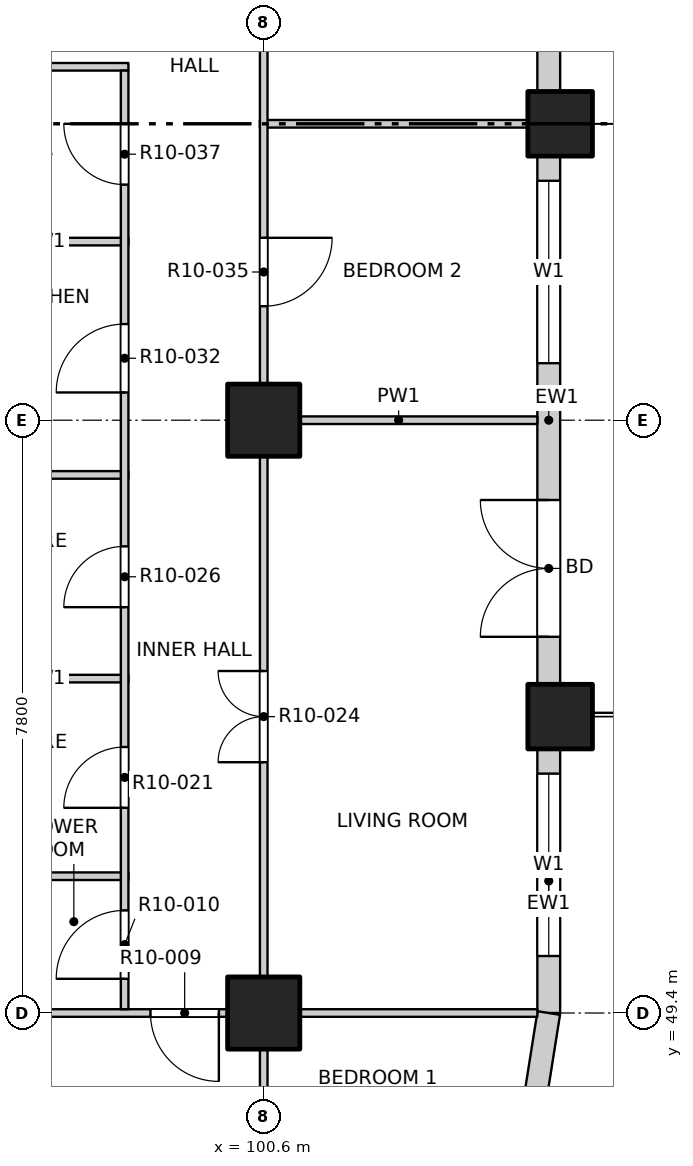
"""IFC4 building model, lengths in metres.
Left out: names, types, materials, properties, quantities, classifications, styles, units other than length and angle.
Written with IfcOpenShell. Run it as: python <this file> out.ifc"""

import sys

from ifc_helpers import new_model, si_unit, direction, frame, frame_2d, origin, origin_2d, place, context, subcontext, project, spatial, rectangle, extrude, element, fill, save


model = new_model("IFC4")
c1 = context("Model", 3, precision=1e-05, world=origin(), true_north=direction((0.0, 1.0)))
c2 = subcontext(c1, "Body", "Model", "MODEL_VIEW")
j1 = project(units=[si_unit("LENGTHUNIT", "METRE"), si_unit("PLANEANGLEUNIT", "RADIAN")], contexts=[c1])
p1 = place(None, origin())
s1 = spatial("IfcSite", under=j1, at=p1, CompositionType="ELEMENT")
p2 = place(p1, origin())
s2 = spatial("IfcBuilding", under=s1, at=p2, CompositionType="ELEMENT")
p3 = place(p2, frame((0.0, 0.0, 123.7)))
s3 = spatial("IfcBuildingStorey", under=s2, at=p3, CompositionType="ELEMENT", Elevation=123.7)
for number, where, z_axis, x_axis in (
    (1, (104.5, 53.3, -0.3), (0.0, 0.0, 1.0), (1.0, 0.0, 0.0)),
    (2, (104.5, 61.1, -0.3), (0.0, 0.0, 1.0), (1.0, 0.0, 0.0)),
):
    element("IfcColumn", number, at=place(p3, frame(where, z_axis=z_axis, x_axis=x_axis)), inside=s3, PredefinedType="COLUMN", context=c2, shape_type="SweptSolid", body=[
        extrude(rectangle(XDim=0.85, YDim=0.85, at=origin_2d()), origin(), (0.0, 0.0, 1.0), 3.45),
    ])
for number, where, z_axis, x_axis in (
    (3, (100.6, 49.4, -0.3), (0.0, 0.0, 1.0), (1.0, 0.0, 0.0)),
    (4, (100.6, 57.2, -0.3), (0.0, 0.0, 1.0), (1.0, 0.0, 0.0)),
):
    element("IfcColumn", number, at=place(p3, frame(where, z_axis=z_axis, x_axis=x_axis)), inside=s3, PredefinedType="COLUMN", context=c2, shape_type="SweptSolid", body=[
        extrude(rectangle(XDim=0.95, YDim=0.95, at=origin_2d()), origin(), (0.0, 0.0, 1.0), 3.45),
    ])
p4 = place(p3, frame((104.35, 49.4, 0.0), z_axis=(0.0, 0.0, 1.0), x_axis=(0.0, 1.0, 0.0)))
e5 = element("IfcWall", 5, at=p4, inside=s3, PredefinedType="SOLIDWALL", context=c2, shape_type="SweptSolid", body=[
    extrude(rectangle(XDim=3.475, YDim=0.3, at=frame_2d((1.738, 0.0))), origin(), (0.0, 0.0, 1.0), 2.7),
])
p5 = place(p4, frame((0.75, 0.0, 0.9)))
e6 = element("IfcOpeningElement", 6, at=p5, cuts=e5, PredefinedType="OPENING", context=c2, shape_type="SweptSolid", body=[
    extrude(rectangle(XDim=2.4, YDim=1.8, at=frame_2d((1.2, 0.9))), frame((0.0, 0.16, 0.0), z_axis=(0.0, -1.0, 0.0), x_axis=(1.0, 0.0, 0.0)), (0.0, 0.0, 1.0), 0.32),
])
p6 = place(p3, frame((104.35, 53.725, 0.0), z_axis=(0.0, 0.0, 1.0), x_axis=(0.0, 1.0, 0.0)))
e7 = element("IfcWall", 7, at=p6, inside=s3, PredefinedType="SOLIDWALL", context=c2, shape_type="SweptSolid", body=[
    extrude(rectangle(XDim=6.95, YDim=0.3, at=frame_2d((3.475, 0.0))), origin(), (0.0, 0.0, 1.0), 2.7),
])
p7 = place(p6, frame((0.625, 0.0, 0.0)))
e8 = element("IfcOpeningElement", 8, at=p7, cuts=e7, PredefinedType="OPENING", context=c2, shape_type="SweptSolid", body=[
    extrude(rectangle(XDim=1.8, YDim=2.4, at=frame_2d((0.9, 1.2))), frame((0.0, 0.16, 0.0), z_axis=(0.0, -1.0, 0.0), x_axis=(1.0, 0.0, 0.0)), (0.0, 0.0, 1.0), 0.32),
])
p8 = place(p6, frame((4.225, 0.0, 0.9)))
e9 = element("IfcOpeningElement", 9, at=p8, cuts=e7, PredefinedType="OPENING", context=c2, shape_type="SweptSolid", body=[
    extrude(rectangle(XDim=2.4, YDim=1.8, at=frame_2d((1.2, 0.9))), frame((0.0, 0.16, 0.0), z_axis=(0.0, -1.0, 0.0), x_axis=(1.0, 0.0, 0.0)), (0.0, 0.0, 1.0), 0.32),
])
p9 = place(p3, frame((104.35, 61.525, 0.0), z_axis=(0.0, 0.0, 1.0), x_axis=(0.0, 1.0, 0.0)))
e10 = element("IfcWall", 10, at=p9, inside=s3, PredefinedType="SOLIDWALL", context=c2, shape_type="SweptSolid", body=[
    extrude(rectangle(XDim=6.95, YDim=0.3, at=frame_2d((3.475, 0.0))), origin(), (0.0, 0.0, 1.0), 2.7),
])
p10 = place(p9, frame((0.625, 0.0, 0.0)))
e11 = element("IfcOpeningElement", 11, at=p10, cuts=e10, PredefinedType="OPENING", context=c2, shape_type="SweptSolid", body=[
    extrude(rectangle(XDim=1.8, YDim=2.4, at=frame_2d((0.9, 1.2))), frame((0.0, 0.16, 0.0), z_axis=(0.0, -1.0, 0.0), x_axis=(1.0, 0.0, 0.0)), (0.0, 0.0, 1.0), 0.32),
])
p11 = place(p9, frame((4.225, 0.0, 0.9)))
e12 = element("IfcOpeningElement", 12, at=p11, cuts=e10, PredefinedType="OPENING", context=c2, shape_type="SweptSolid", body=[
    extrude(rectangle(XDim=2.4, YDim=1.8, at=frame_2d((1.2, 0.9))), frame((0.0, 0.16, 0.0), z_axis=(0.0, -1.0, 0.0), x_axis=(1.0, 0.0, 0.0)), (0.0, 0.0, 1.0), 0.32),
])
p12 = place(p3, frame((104.167, 48.241, 0.0), z_axis=(0.0, 0.0, 1.0), x_axis=(0.156496880861, 0.987678452879, 0.0)))
e13 = element("IfcWall", 13, at=p12, inside=s3, PredefinedType="SOLIDWALL", context=c2, shape_type="SweptSolid", body=[
    extrude(rectangle(XDim=1.173, YDim=0.3, at=frame_2d((0.586, 0.0))), origin(), (0.0, 0.0, 1.0), 2.7),
])
p13 = place(p3, frame((65.8, 49.4, 0.0), z_axis=(0.0, 0.0, 1.0), x_axis=(1.0, 0.0, 0.0)))
e14 = element("IfcWall", 14, at=p13, inside=s3, PredefinedType="PARTITIONING", context=c2, shape_type="SweptSolid", body=[
    extrude(rectangle(XDim=38.4, YDim=0.1, at=frame_2d((19.2, 0.0))), origin(), (0.0, 0.0, 1.0), 3.15),
])
p14 = place(p13, frame((4.19, 0.0, 0.0)))
e15 = element("IfcOpeningElement", 15, at=p14, cuts=e14, PredefinedType="OPENING", context=c2, shape_type="SweptSolid", body=[
    extrude(rectangle(XDim=0.9, YDim=2.1, at=frame_2d((0.45, 1.05))), frame((0.0, 0.06, 0.0), z_axis=(0.0, -1.0, 0.0), x_axis=(1.0, 0.0, 0.0)), (0.0, 0.0, 1.0), 0.12),
])
p15 = place(p13, frame((9.0, 0.0, 0.0)))
e16 = element("IfcOpeningElement", 16, at=p15, cuts=e14, PredefinedType="OPENING", context=c2, shape_type="SweptSolid", body=[
    extrude(rectangle(XDim=0.9, YDim=2.1, at=frame_2d((0.45, 1.05))), frame((0.0, 0.06, 0.0), z_axis=(0.0, -1.0, 0.0), x_axis=(1.0, 0.0, 0.0)), (0.0, 0.0, 1.0), 0.12),
])
p16 = place(p13, frame((12.9, 0.0, 0.0)))
e17 = element("IfcOpeningElement", 17, at=p16, cuts=e14, PredefinedType="OPENING", context=c2, shape_type="SweptSolid", body=[
    extrude(rectangle(XDim=0.9, YDim=2.1, at=frame_2d((0.45, 1.05))), frame((0.0, 0.06, 0.0), z_axis=(0.0, -1.0, 0.0), x_axis=(1.0, 0.0, 0.0)), (0.0, 0.0, 1.0), 0.12),
])
p17 = place(p13, frame((16.8, 0.0, 0.0)))
e18 = element("IfcOpeningElement", 18, at=p17, cuts=e14, PredefinedType="OPENING", context=c2, shape_type="SweptSolid", body=[
    extrude(rectangle(XDim=0.9, YDim=2.1, at=frame_2d((0.45, 1.05))), frame((0.0, 0.06, 0.0), z_axis=(0.0, -1.0, 0.0), x_axis=(1.0, 0.0, 0.0)), (0.0, 0.0, 1.0), 0.12),
])
p18 = place(p13, frame((22.5, 0.0, 0.0)))
e19 = element("IfcOpeningElement", 19, at=p18, cuts=e14, PredefinedType="OPENING", context=c2, shape_type="SweptSolid", body=[
    extrude(rectangle(XDim=1.2, YDim=2.1, at=frame_2d((0.6, 1.05))), frame((0.0, 0.06, 0.0), z_axis=(0.0, -1.0, 0.0), x_axis=(1.0, 0.0, 0.0)), (0.0, 0.0, 1.0), 0.12),
])
p19 = place(p13, frame((28.5, 0.0, 0.0)))
e20 = element("IfcOpeningElement", 20, at=p19, cuts=e14, PredefinedType="OPENING", context=c2, shape_type="SweptSolid", body=[
    extrude(rectangle(XDim=0.9, YDim=2.1, at=frame_2d((0.45, 1.05))), frame((0.0, 0.06, 0.0), z_axis=(0.0, -1.0, 0.0), x_axis=(1.0, 0.0, 0.0)), (0.0, 0.0, 1.0), 0.12),
])
p20 = place(p13, frame((33.31, 0.0, 0.0)))
e21 = element("IfcOpeningElement", 21, at=p20, cuts=e14, PredefinedType="OPENING", context=c2, shape_type="SweptSolid", body=[
    extrude(rectangle(XDim=0.9, YDim=2.1, at=frame_2d((0.45, 1.05))), frame((0.0, 0.06, 0.0), z_axis=(0.0, -1.0, 0.0), x_axis=(1.0, 0.0, 0.0)), (0.0, 0.0, 1.0), 0.12),
])
p21 = place(p3, frame((96.8, 51.2, 0.0), z_axis=(0.0, 0.0, 1.0), x_axis=(1.0, 0.0, 0.0)))
e22 = element("IfcWall", 22, at=p21, inside=s3, PredefinedType="PARTITIONING", context=c2, shape_type="SweptSolid", body=[
    extrude(rectangle(XDim=2.02, YDim=0.1, at=frame_2d((1.01, 0.0))), origin(), (0.0, 0.0, 1.0), 3.15),
])
for number, where, z_axis, x_axis in (
    (23, (96.6, 53.8, 0.0), (0.0, 0.0, 1.0), (1.0, 0.0, 0.0)),
    (24, (96.6, 56.48, 0.0), (0.0, 0.0, 1.0), (1.0, 0.0, 0.0)),
):
    element("IfcWall", number, at=place(p3, frame(where, z_axis=z_axis, x_axis=x_axis)), inside=s3, PredefinedType="PARTITIONING", context=c2, shape_type="SweptSolid", body=[
        extrude(rectangle(XDim=2.22, YDim=0.1, at=frame_2d((1.11, 0.0))), origin(), (0.0, 0.0, 1.0), 3.15),
    ])
p22 = place(p3, frame((100.55, 57.2, 0.0), z_axis=(0.0, 0.0, 1.0), x_axis=(1.0, 0.0, 0.0)))
e25 = element("IfcWall", 25, at=p22, inside=s3, PredefinedType="PARTITIONING", context=c2, shape_type="SweptSolid", body=[
    extrude(rectangle(XDim=3.65, YDim=0.1, at=frame_2d((1.825, 0.0))), origin(), (0.0, 0.0, 1.0), 3.15),
])
p23 = place(p3, frame((96.6, 59.55, 0.0), z_axis=(0.0, 0.0, 1.0), x_axis=(1.0, 0.0, 0.0)))
e26 = element("IfcWall", 26, at=p23, inside=s3, PredefinedType="PARTITIONING", context=c2, shape_type="SweptSolid", body=[
    extrude(rectangle(XDim=2.22, YDim=0.1, at=frame_2d((1.11, 0.0))), origin(), (0.0, 0.0, 1.0), 3.15),
])
p24 = place(p3, frame((100.55, 61.1, 0.0), z_axis=(0.0, 0.0, 1.0), x_axis=(1.0, 0.0, 0.0)))
e27 = element("IfcWall", 27, at=p24, inside=s3, PredefinedType="PARTITIONING", context=c2, shape_type="SweptSolid", body=[
    extrude(rectangle(XDim=3.65, YDim=0.1, at=frame_2d((1.825, 0.0))), origin(), (0.0, 0.0, 1.0), 2.55),
])
p25 = place(p3, frame((96.6, 61.85, 0.0), z_axis=(0.0, 0.0, 1.0), x_axis=(1.0, 0.0, 0.0)))
e28 = element("IfcWall", 28, at=p25, inside=s3, PredefinedType="PARTITIONING", context=c2, shape_type="SweptSolid", body=[
    extrude(rectangle(XDim=2.22, YDim=0.1, at=frame_2d((1.11, 0.0))), origin(), (0.0, 0.0, 1.0), 3.15),
])
p26 = place(p3, frame((98.77, 49.45, 0.0), z_axis=(0.0, 0.0, 1.0), x_axis=(0.0, 1.0, 0.0)))
e29 = element("IfcWall", 29, at=p26, inside=s3, PredefinedType="PARTITIONING", context=c2, shape_type="SweptSolid", body=[
    extrude(rectangle(XDim=12.35, YDim=0.1, at=frame_2d((6.175, 0.0))), origin(), (0.0, 0.0, 1.0), 3.15),
])
p27 = place(p26, frame((0.4, 0.0, 0.0)))
e30 = element("IfcOpeningElement", 30, at=p27, cuts=e29, PredefinedType="OPENING", context=c2, shape_type="SweptSolid", body=[
    extrude(rectangle(XDim=0.9, YDim=2.1, at=frame_2d((0.45, 1.05))), frame((0.0, 0.06, 0.0), z_axis=(0.0, -1.0, 0.0), x_axis=(1.0, 0.0, 0.0)), (0.0, 0.0, 1.0), 0.12),
])
p28 = place(p26, frame((2.65, 0.0, 0.0)))
e31 = element("IfcOpeningElement", 31, at=p28, cuts=e29, PredefinedType="OPENING", context=c2, shape_type="SweptSolid", body=[
    extrude(rectangle(XDim=0.8, YDim=2.1, at=frame_2d((0.4, 1.05))), frame((0.0, 0.06, 0.0), z_axis=(0.0, -1.0, 0.0), x_axis=(1.0, 0.0, 0.0)), (0.0, 0.0, 1.0), 0.12),
])
p29 = place(p26, frame((5.29, 0.0, 0.0)))
e32 = element("IfcOpeningElement", 32, at=p29, cuts=e29, PredefinedType="OPENING", context=c2, shape_type="SweptSolid", body=[
    extrude(rectangle(XDim=0.8, YDim=2.1, at=frame_2d((0.4, 1.05))), frame((0.0, 0.06, 0.0), z_axis=(0.0, -1.0, 0.0), x_axis=(1.0, 0.0, 0.0)), (0.0, 0.0, 1.0), 0.12),
])
p30 = place(p26, frame((8.115, 0.0, 0.0)))
e33 = element("IfcOpeningElement", 33, at=p30, cuts=e29, PredefinedType="OPENING", context=c2, shape_type="SweptSolid", body=[
    extrude(rectangle(XDim=0.9, YDim=2.1, at=frame_2d((0.45, 1.05))), frame((0.0, 0.06, 0.0), z_axis=(0.0, -1.0, 0.0), x_axis=(1.0, 0.0, 0.0)), (0.0, 0.0, 1.0), 0.12),
])
p31 = place(p26, frame((10.85, 0.0, 0.0)))
e34 = element("IfcOpeningElement", 34, at=p31, cuts=e29, PredefinedType="OPENING", context=c2, shape_type="SweptSolid", body=[
    extrude(rectangle(XDim=0.8, YDim=2.1, at=frame_2d((0.4, 1.05))), frame((0.0, 0.06, 0.0), z_axis=(0.0, -1.0, 0.0), x_axis=(1.0, 0.0, 0.0)), (0.0, 0.0, 1.0), 0.12),
])
p32 = place(p3, frame((100.6, 45.8, 0.0), z_axis=(0.0, 0.0, 1.0), x_axis=(0.0, 1.0, 0.0)))
e35 = element("IfcWall", 35, at=p32, inside=s3, PredefinedType="PARTITIONING", context=c2, shape_type="SweptSolid", body=[
    extrude(rectangle(XDim=38.4, YDim=0.1, at=frame_2d((19.2, 0.0))), origin(), (0.0, 0.0, 1.0), 3.15),
])
p33 = place(p32, frame((1.05, 0.0, 0.0)))
e36 = element("IfcOpeningElement", 36, at=p33, cuts=e35, PredefinedType="OPENING", context=c2, shape_type="SweptSolid", body=[
    extrude(rectangle(XDim=1.2, YDim=2.1, at=frame_2d((0.6, 1.05))), frame((0.0, 0.06, 0.0), z_axis=(0.0, -1.0, 0.0), x_axis=(1.0, 0.0, 0.0)), (0.0, 0.0, 1.0), 0.12),
])
p34 = place(p32, frame((6.9, 0.0, 0.0)))
e37 = element("IfcOpeningElement", 37, at=p34, cuts=e35, PredefinedType="OPENING", context=c2, shape_type="SweptSolid", body=[
    extrude(rectangle(XDim=1.2, YDim=2.1, at=frame_2d((0.6, 1.05))), frame((0.0, 0.06, 0.0), z_axis=(0.0, -1.0, 0.0), x_axis=(1.0, 0.0, 0.0)), (0.0, 0.0, 1.0), 0.12),
])
p35 = place(p32, frame((12.9, 0.0, 0.0)))
e38 = element("IfcOpeningElement", 38, at=p35, cuts=e35, PredefinedType="OPENING", context=c2, shape_type="SweptSolid", body=[
    extrude(rectangle(XDim=0.9, YDim=2.1, at=frame_2d((0.45, 1.05))), frame((0.0, 0.06, 0.0), z_axis=(0.0, -1.0, 0.0), x_axis=(1.0, 0.0, 0.0)), (0.0, 0.0, 1.0), 0.12),
])
p36 = place(p32, frame((16.8, 0.0, 0.0)))
e39 = element("IfcOpeningElement", 39, at=p36, cuts=e35, PredefinedType="OPENING", context=c2, shape_type="SweptSolid", body=[
    extrude(rectangle(XDim=0.9, YDim=2.1, at=frame_2d((0.45, 1.05))), frame((0.0, 0.06, 0.0), z_axis=(0.0, -1.0, 0.0), x_axis=(1.0, 0.0, 0.0)), (0.0, 0.0, 1.0), 0.12),
])
p37 = place(p32, frame((20.7, 0.0, 0.0)))
e40 = element("IfcOpeningElement", 40, at=p37, cuts=e35, PredefinedType="OPENING", context=c2, shape_type="SweptSolid", body=[
    extrude(rectangle(XDim=0.9, YDim=2.1, at=frame_2d((0.45, 1.05))), frame((0.0, 0.06, 0.0), z_axis=(0.0, -1.0, 0.0), x_axis=(1.0, 0.0, 0.0)), (0.0, 0.0, 1.0), 0.12),
])
p38 = place(p32, frame((27.575, 0.0, 0.0)))
e41 = element("IfcOpeningElement", 41, at=p38, cuts=e35, PredefinedType="OPENING", context=c2, shape_type="SweptSolid", body=[
    extrude(rectangle(XDim=1.2, YDim=2.1, at=frame_2d((0.6, 1.05))), frame((0.0, 0.06, 0.0), z_axis=(0.0, -1.0, 0.0), x_axis=(1.0, 0.0, 0.0)), (0.0, 0.0, 1.0), 0.12),
])
p39 = place(p32, frame((32.4, 0.0, 0.0)))
e42 = element("IfcOpeningElement", 42, at=p39, cuts=e35, PredefinedType="OPENING", context=c2, shape_type="SweptSolid", body=[
    extrude(rectangle(XDim=0.9, YDim=2.1, at=frame_2d((0.45, 1.05))), frame((0.0, 0.06, 0.0), z_axis=(0.0, -1.0, 0.0), x_axis=(1.0, 0.0, 0.0)), (0.0, 0.0, 1.0), 0.12),
])
p40 = place(p32, frame((36.15, 0.0, 0.0)))
e43 = element("IfcOpeningElement", 43, at=p40, cuts=e35, PredefinedType="OPENING", context=c2, shape_type="SweptSolid", body=[
    extrude(rectangle(XDim=1.2, YDim=2.1, at=frame_2d((0.6, 1.05))), frame((0.0, 0.06, 0.0), z_axis=(0.0, -1.0, 0.0), x_axis=(1.0, 0.0, 0.0)), (0.0, 0.0, 1.0), 0.12),
])
p41 = place(p5, origin())
e44 = element("IfcWindow", 44, at=p41, inside=s3, PartitioningType="DOUBLE_PANEL_VERTICAL", PredefinedType="WINDOW", context=c2, shape_type="SweptSolid", body=[
    extrude(rectangle(XDim=2.4, YDim=1.8, at=frame_2d((1.2, 0.9))), frame((0.0, 0.03, 0.0), z_axis=(0.0, -1.0, 0.0), x_axis=(1.0, 0.0, 0.0)), (0.0, 0.0, 1.0), 0.06),
])
fill(e6, e44)
p42 = place(p7, origin())
e45 = element("IfcDoor", 45, at=p42, inside=s3, OperationType="DOUBLE_DOOR_SINGLE_SWING", PredefinedType="DOOR", context=c2, shape_type="SweptSolid", body=[
    extrude(rectangle(XDim=1.8, YDim=2.4, at=frame_2d((0.9, 1.2))), frame((0.0, 0.025, 0.0), z_axis=(0.0, -1.0, 0.0), x_axis=(1.0, 0.0, 0.0)), (0.0, 0.0, 1.0), 0.05),
])
fill(e8, e45)
p43 = place(p8, origin())
e46 = element("IfcWindow", 46, at=p43, inside=s3, PartitioningType="DOUBLE_PANEL_VERTICAL", PredefinedType="WINDOW", context=c2, shape_type="SweptSolid", body=[
    extrude(rectangle(XDim=2.4, YDim=1.8, at=frame_2d((1.2, 0.9))), frame((0.0, 0.03, 0.0), z_axis=(0.0, -1.0, 0.0), x_axis=(1.0, 0.0, 0.0)), (0.0, 0.0, 1.0), 0.06),
])
fill(e9, e46)
p44 = place(p20, origin())
e47 = element("IfcDoor", 47, at=p44, inside=s3, OperationType="SINGLE_SWING_LEFT", PredefinedType="DOOR", context=c2, shape_type="SweptSolid", body=[
    extrude(rectangle(XDim=0.9, YDim=2.1, at=frame_2d((0.45, 1.05))), frame((0.0, 0.025, 0.0), z_axis=(0.0, -1.0, 0.0), x_axis=(1.0, 0.0, 0.0)), (0.0, 0.0, 1.0), 0.05),
])
fill(e21, e47)
p45 = place(p27, origin())
e48 = element("IfcDoor", 48, at=p45, inside=s3, OperationType="SINGLE_SWING_LEFT", PredefinedType="DOOR", context=c2, shape_type="SweptSolid", body=[
    extrude(rectangle(XDim=0.9, YDim=2.1, at=frame_2d((0.45, 1.05))), frame((0.0, 0.025, 0.0), z_axis=(0.0, -1.0, 0.0), x_axis=(1.0, 0.0, 0.0)), (0.0, 0.0, 1.0), 0.05),
])
fill(e30, e48)
p46 = place(p28, origin())
e49 = element("IfcDoor", 49, at=p46, inside=s3, OperationType="SINGLE_SWING_LEFT", PredefinedType="DOOR", context=c2, shape_type="SweptSolid", body=[
    extrude(rectangle(XDim=0.8, YDim=2.1, at=frame_2d((0.4, 1.05))), frame((0.0, 0.025, 0.0), z_axis=(0.0, -1.0, 0.0), x_axis=(1.0, 0.0, 0.0)), (0.0, 0.0, 1.0), 0.05),
])
fill(e31, e49)
p47 = place(p34, origin())
e50 = element("IfcDoor", 50, at=p47, inside=s3, OperationType="DOUBLE_DOOR_SINGLE_SWING", PredefinedType="DOOR", context=c2, shape_type="SweptSolid", body=[
    extrude(rectangle(XDim=1.2, YDim=2.1, at=frame_2d((0.6, 1.05))), frame((0.0, 0.025, 0.0), z_axis=(0.0, -1.0, 0.0), x_axis=(1.0, 0.0, 0.0)), (0.0, 0.0, 1.0), 0.05),
])
fill(e37, e50)
p48 = place(p29, origin())
e51 = element("IfcDoor", 51, at=p48, inside=s3, OperationType="SINGLE_SWING_LEFT", PredefinedType="DOOR", context=c2, shape_type="SweptSolid", body=[
    extrude(rectangle(XDim=0.8, YDim=2.1, at=frame_2d((0.4, 1.05))), frame((0.0, 0.025, 0.0), z_axis=(0.0, -1.0, 0.0), x_axis=(1.0, 0.0, 0.0)), (0.0, 0.0, 1.0), 0.05),
])
fill(e32, e51)
p49 = place(p30, origin())
e52 = element("IfcDoor", 52, at=p49, inside=s3, OperationType="SINGLE_SWING_LEFT", PredefinedType="DOOR", context=c2, shape_type="SweptSolid", body=[
    extrude(rectangle(XDim=0.9, YDim=2.1, at=frame_2d((0.45, 1.05))), frame((0.0, 0.025, 0.0), z_axis=(0.0, -1.0, 0.0), x_axis=(1.0, 0.0, 0.0)), (0.0, 0.0, 1.0), 0.05),
])
fill(e33, e52)
p50 = place(p35, origin())
e53 = element("IfcDoor", 53, at=p50, inside=s3, OperationType="SINGLE_SWING_LEFT", PredefinedType="DOOR", context=c2, shape_type="SweptSolid", body=[
    extrude(rectangle(XDim=0.9, YDim=2.1, at=frame_2d((0.45, 1.05))), frame((0.0, 0.025, 0.0), z_axis=(0.0, -1.0, 0.0), x_axis=(1.0, 0.0, 0.0)), (0.0, 0.0, 1.0), 0.05),
])
fill(e38, e53)
p51 = place(p31, origin())
e54 = element("IfcDoor", 54, at=p51, inside=s3, OperationType="SINGLE_SWING_RIGHT", PredefinedType="DOOR", context=c2, shape_type="SweptSolid", body=[
    extrude(rectangle(XDim=0.8, YDim=2.1, at=frame_2d((0.4, 1.05))), frame((0.0, 0.025, 0.0), z_axis=(0.0, -1.0, 0.0), x_axis=(1.0, 0.0, 0.0)), (0.0, 0.0, 1.0), 0.05),
])
fill(e34, e54)
save(model, sys.argv[1])
